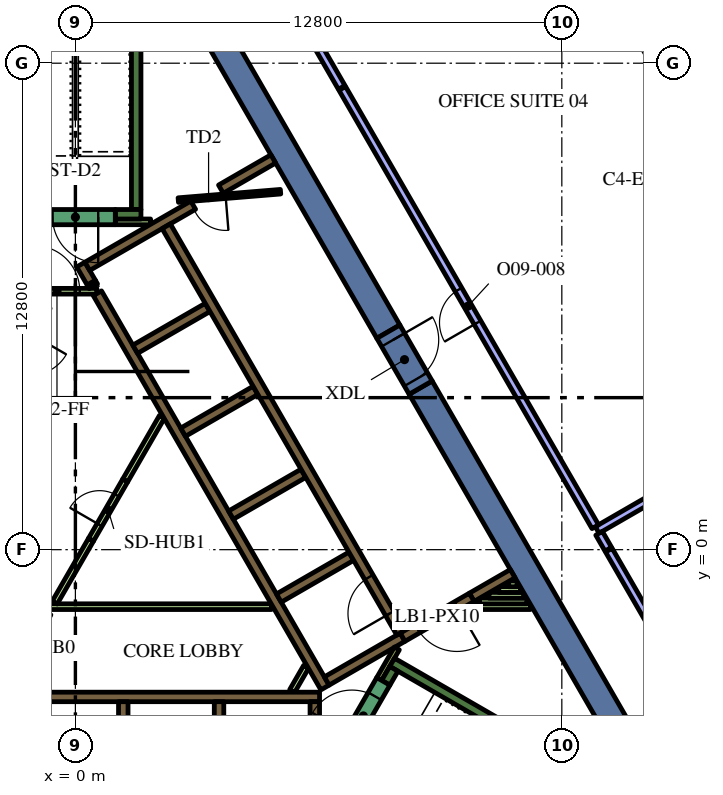
"""IFC4 building model, lengths in metres.
Left out: names, types, materials, properties, quantities, classifications, styles, units other than length and angle.
Written with IfcOpenShell. Run it as: python <this file> out.ifc"""

import sys

from ifc_helpers import new_model, si_unit, direction, frame, frame_2d, origin, place, context, subcontext, project, spatial, rectangle, extrude, element, fill, save


model = new_model("IFC4")
c1 = context("Model", 3, precision=1e-05, world=origin(), true_north=direction((0.0, 1.0)))
c2 = subcontext(c1, "Body", "Model", "MODEL_VIEW")
j1 = project(units=[si_unit("LENGTHUNIT", "METRE"), si_unit("PLANEANGLEUNIT", "RADIAN")], contexts=[c1])
p1 = place(None, origin())
s1 = spatial("IfcSite", under=j1, at=p1, CompositionType="ELEMENT")
p2 = place(p1, origin())
s2 = spatial("IfcBuilding", under=s1, at=p2, CompositionType="ELEMENT")
p3 = place(p2, frame((0.0, 0.0, 243.6)))
s3 = spatial("IfcBuildingStorey", under=s2, at=p3, CompositionType="ELEMENT", Elevation=243.6)
for number, where, z_axis, x_axis in (
    (1, (9.085, 4.264, 0.0), (0.0, 0.0, 1.0), (0.5, -0.866, 0.0)),
    (2, (8.235, 5.736, 0.0), (0.0, 0.0, 1.0), (-0.5, 0.866, 0.0)),
):
    element("IfcWall", number, at=place(p3, frame(where, z_axis=z_axis, x_axis=x_axis)), inside=s3, PredefinedType="SOLIDWALL", context=c2, shape_type="SweptSolid", body=[
        extrude(rectangle(XDim=12.472, YDim=0.7, at=frame_2d((6.236, 0.0))), origin(), (0.0, 0.0, 1.0), 4.2),
    ])
p4 = place(p3, frame((8.334, -2.964, 0.0), z_axis=(0.0, 0.0, 1.0), x_axis=(0.866016039709, -0.500016218704, 0.0)))
e3 = element("IfcWall", 3, at=p4, inside=s3, PredefinedType="SOLIDWALL", context=c2, shape_type="SweptSolid", body=[
    extrude(rectangle(XDim=7.05, YDim=0.25, at=frame_2d((3.525, 0.0))), origin(), (0.0, 0.0, 1.0), 4.2),
])
p5 = place(p3, frame((8.168, -3.503, 0.0), z_axis=(0.0, 0.0, 1.0), x_axis=(0.49972245349, 0.866185586049, 0.0)))
e4 = element("IfcWall", 4, at=p5, inside=s3, PredefinedType="SOLIDWALL", context=c2, shape_type="SweptSolid", body=[
    extrude(rectangle(XDim=0.425, YDim=0.25, at=frame_2d((0.212, 0.0))), origin(), (0.0, 0.0, 1.0), 4.2),
])
p6 = place(p3, frame((1.6, 8.95, 0.0), z_axis=(0.0, 0.0, 1.0), x_axis=(0.0, 1.0, 0.0)))
e5 = element("IfcWall", 5, at=p6, inside=s3, PredefinedType="SOLIDWALL", context=c2, shape_type="SweptSolid", body=[
    extrude(rectangle(XDim=6.8, YDim=0.25, at=frame_2d((3.4, 0.0))), origin(), (0.0, 0.0, 1.0), 4.2),
])
p7 = place(p3, frame((1.05, 8.825, 0.0), z_axis=(0.0, 0.0, 1.0), x_axis=(1.0, 0.0, 0.0)))
e6 = element("IfcWall", 6, at=p7, inside=s3, PredefinedType="SOLIDWALL", context=c2, shape_type="SweptSolid", body=[
    extrude(rectangle(XDim=0.675, YDim=0.25, at=frame_2d((0.337, 0.0))), origin(), (0.0, 0.0, 1.0), 4.2),
])
p8 = place(p3, frame((-5.545, -3.875, 0.0), z_axis=(0.0, 0.0, 1.0), x_axis=(1.0, 0.0, 0.0)))
e7 = element("IfcWall", 7, at=p8, inside=s3, PredefinedType="SOLIDWALL", context=c2, shape_type="SweptSolid", body=[
    extrude(rectangle(XDim=11.97, YDim=0.25, at=frame_2d((5.985, 0.0))), origin(), (0.0, 0.0, 1.0), 4.2),
])
p9 = place(p3, frame((6.3, -7.24, 0.0), z_axis=(0.0, 0.0, 1.0), x_axis=(0.0, 1.0, 0.0)))
e8 = element("IfcWall", 8, at=p9, inside=s3, PredefinedType="SOLIDWALL", context=c2, shape_type="SweptSolid", body=[
    extrude(rectangle(XDim=3.24, YDim=0.25, at=frame_2d((1.62, 0.0))), origin(), (0.0, 0.0, 1.0), 4.2),
])
for number, where, z_axis, x_axis in (
    (9, (3.78, -4.0, 0.0), (0.0, 0.0, 1.0), (0.0, -1.0, 0.0)),
    (10, (1.26, -4.0, 0.0), (0.0, 0.0, 1.0), (0.0, -1.0, 0.0)),
):
    element("IfcWall", number, at=place(p3, frame(where, z_axis=z_axis, x_axis=x_axis)), inside=s3, PredefinedType="SOLIDWALL", context=c2, shape_type="SweptSolid", body=[
        extrude(rectangle(XDim=2.2, YDim=0.25, at=frame_2d((1.1, 0.0))), origin(), (0.0, 0.0, 1.0), 4.2),
    ])
p10 = place(p3, frame((11.507, -0.631, 0.0), z_axis=(0.0, 0.0, 1.0), x_axis=(-0.866025525965, -0.499999788377, 0.0)))
e11 = element("IfcWall", 11, at=p10, inside=s3, PredefinedType="SOLIDWALL", context=c2, shape_type="SweptSolid", body=[
    extrude(rectangle(XDim=1.245, YDim=0.25, at=frame_2d((0.622, 0.0))), origin(), (0.0, 0.0, 1.0), 4.2),
])
p11 = place(p3, frame((0.473, 6.93, 0.0), z_axis=(0.0, 0.0, 1.0), x_axis=(-0.49972245349, 0.866185586049, 0.0)))
e12 = element("IfcWall", 12, at=p11, inside=s3, PredefinedType="SOLIDWALL", context=c2, shape_type="SweptSolid", body=[
    extrude(rectangle(XDim=0.11, YDim=0.25, at=frame_2d((0.055, 0.0))), origin(), (0.0, 0.0, 1.0), 4.2),
])
p12 = place(p3, frame((6.568, -3.627, 0.0), z_axis=(0.0, 0.0, 1.0), x_axis=(-0.499999455981, 0.866025717874, 0.0)))
e13 = element("IfcWall", 13, at=p12, inside=s3, PredefinedType="SOLIDWALL", context=c2, shape_type="SweptSolid", body=[
    extrude(rectangle(XDim=11.978, YDim=0.25, at=frame_2d((5.989, 0.0))), origin(), (0.0, 0.0, 1.0), 4.2),
])
p13 = place(p3, frame((0.417, 7.027, 0.0), z_axis=(0.0, 0.0, 1.0), x_axis=(-0.500210807569, 0.865903659763, 0.0)))
e14 = element("IfcWall", 14, at=p13, inside=s3, PredefinedType="SOLIDWALL", context=c2, shape_type="SweptSolid", body=[
    extrude(rectangle(XDim=0.548, YDim=0.25, at=frame_2d((0.274, 0.0))), origin(), (0.0, 0.0, 1.0), 4.2),
])
p14 = place(p3, frame((3.1, 9.064, 0.0), z_axis=(0.0, 0.0, 1.0), x_axis=(-0.866030133475, -0.499991807846, 0.0)))
e15 = element("IfcWall", 15, at=p14, inside=s3, PredefinedType="SOLIDWALL", context=c2, shape_type="SweptSolid", body=[
    extrude(rectangle(XDim=3.217, YDim=0.25, at=frame_2d((1.608, 0.0))), origin(), (0.0, 0.0, 1.0), 4.2),
])
p15 = place(p3, frame((1.574, 5.274, 0.0), z_axis=(0.0, 0.0, 1.0), x_axis=(0.866028486751, 0.499994660107, 0.0)))
e16 = element("IfcWall", 16, at=p15, inside=s3, PredefinedType="SOLIDWALL", context=c2, shape_type="SweptSolid", body=[
    extrude(rectangle(XDim=2.2, YDim=0.25, at=frame_2d((1.1, 0.0))), origin(), (0.0, 0.0, 1.0), 4.2),
])
for number, where, z_axis, x_axis in (
    (17, (2.834, 3.091, 0.0), (0.0, 0.0, 1.0), (0.866, 0.5, 0.0)),
    (18, (4.094, 0.909, 0.0), (0.0, 0.0, 1.0), (0.866, 0.5, 0.0)),
    (19, (5.354, -1.274, 0.0), (0.0, 0.0, 1.0), (0.866, 0.5, 0.0)),
):
    element("IfcWall", number, at=place(p3, frame(where, z_axis=z_axis, x_axis=x_axis)), inside=s3, PredefinedType="SOLIDWALL", context=c2, shape_type="SweptSolid", body=[
        extrude(rectangle(XDim=2.2, YDim=0.25, at=frame_2d((1.1, 0.0))), origin(), (0.0, 0.0, 1.0), 4.2),
    ])
p16 = place(p3, frame((6.614, -3.456, 0.0), z_axis=(0.0, 0.0, 1.0), x_axis=(0.866025089694, 0.500000544019, 0.0)))
e20 = element("IfcWall", 20, at=p16, inside=s3, PredefinedType="SOLIDWALL", context=c2, shape_type="SweptSolid", body=[
    extrude(rectangle(XDim=2.305, YDim=0.25, at=frame_2d((1.153, 0.0))), origin(), (0.0, 0.0, 1.0), 4.2),
])
p17 = place(p3, frame((3.83, 9.486, 0.0), z_axis=(0.0, 0.0, 1.0), x_axis=(0.865986202621, 0.500067892261, 0.0)))
e21 = element("IfcWall", 21, at=p17, inside=s3, PredefinedType="SOLIDWALL", context=c2, shape_type="SweptSolid", body=[
    extrude(rectangle(XDim=1.591, YDim=0.25, at=frame_2d((0.795, 0.0))), origin(), (0.0, 0.0, 1.0), 4.2),
])
p18 = place(p3, frame((1.05, 8.625, 0.0), z_axis=(0.0, 0.0, 1.0), x_axis=(1.0, 0.0, 0.0)))
e22 = element("IfcWall", 22, at=p18, inside=s3, PredefinedType="PARTITIONING", context=c2, shape_type="SweptSolid", body=[
    extrude(rectangle(XDim=0.929, YDim=0.15, at=frame_2d((0.464, 0.0))), origin(), (0.0, 0.0, 1.0), 3.45),
])
p19 = place(p3, frame((10.362, -1.5, 0.0), z_axis=(0.0, 0.0, 1.0), x_axis=(1.0, 0.0, 0.0)))
e23 = element("IfcWall", 23, at=p19, inside=s3, PredefinedType="PARTITIONING", context=c2, shape_type="SweptSolid", body=[
    extrude(rectangle(XDim=1.61, YDim=0.15, at=frame_2d((0.805, 0.0))), origin(), (0.0, 0.0, 1.0), 3.45),
])
p20 = place(p3, frame((10.622, -1.35, 0.0), z_axis=(0.0, 0.0, 1.0), x_axis=(1.0, 0.0, 0.0)))
e24 = element("IfcWall", 24, at=p20, inside=s3, PredefinedType="PARTITIONING", context=c2, shape_type="SweptSolid", body=[
    extrude(rectangle(XDim=1.263, YDim=0.15, at=frame_2d((0.632, 0.0))), origin(), (0.0, 0.0, 1.0), 3.45),
])
p21 = place(p3, frame((10.882, -1.2, 0.0), z_axis=(0.0, 0.0, 1.0), x_axis=(1.0, 0.0, 0.0)))
e25 = element("IfcWall", 25, at=p21, inside=s3, PredefinedType="PARTITIONING", context=c2, shape_type="SweptSolid", body=[
    extrude(rectangle(XDim=0.917, YDim=0.15, at=frame_2d((0.459, 0.0))), origin(), (0.0, 0.0, 1.0), 3.45),
])
p22 = place(p3, frame((11.712, -1.05, 0.0), z_axis=(0.0, 0.0, 1.0), x_axis=(-1.0, 0.0, 0.0)))
e26 = element("IfcWall", 26, at=p22, inside=s3, PredefinedType="PARTITIONING", context=c2, shape_type="SweptSolid", body=[
    extrude(rectangle(XDim=0.571, YDim=0.15, at=frame_2d((0.285, 0.0))), origin(), (0.0, 0.0, 1.0), 3.45),
])
p23 = place(p3, frame((11.401, -0.9, 0.0), z_axis=(0.0, 0.0, 1.0), x_axis=(1.0, 0.0, 0.0)))
e27 = element("IfcWall", 27, at=p23, inside=s3, PredefinedType="PARTITIONING", context=c2, shape_type="SweptSolid", body=[
    extrude(rectangle(XDim=0.224, YDim=0.15, at=frame_2d((0.112, 0.0))), origin(), (0.0, 0.0, 1.0), 3.45),
])
p24 = place(p3, frame((8.459, -2.599, 0.0), z_axis=(0.0, 0.0, 1.0), x_axis=(-0.500041054325, -0.866001699761, 0.0)))
e28 = element("IfcWall", 28, at=p24, inside=s3, PredefinedType="PARTITIONING", context=c2, shape_type="SweptSolid", body=[
    extrude(rectangle(XDim=0.929, YDim=0.15, at=frame_2d((0.464, 0.0))), origin(), (0.0, 0.0, 1.0), 4.2),
])
p25 = place(p3, frame((5.705, -3.718, 0.0), z_axis=(0.0, 0.0, 1.0), x_axis=(0.499962090823, 0.866047289552, 0.0)))
e29 = element("IfcWall", 29, at=p25, inside=s3, PredefinedType="PARTITIONING", context=c2, shape_type="SweptSolid", body=[
    extrude(rectangle(XDim=0.735, YDim=0.15, at=frame_2d((0.367, 0.0))), origin(), (0.0, 0.0, 1.0), 3.45),
])
p26 = place(p3, frame((-4.2, -1.5, 0.0), z_axis=(0.0, 0.0, 1.0), x_axis=(1.0, 0.0, 0.0)))
e30 = element("IfcWall", 30, at=p26, inside=s3, PredefinedType="PARTITIONING", context=c2, shape_type="SweptSolid", body=[
    extrude(rectangle(XDim=9.359, YDim=0.15, at=frame_2d((4.68, 0.0))), origin(), (0.0, 0.0, 1.0), 3.45),
])
p27 = place(p3, frame((-0.544, -1.393, 0.0), z_axis=(0.0, 0.0, 1.0), x_axis=(0.499928740635, 0.866066541489, 0.0)))
e31 = element("IfcWall", 31, at=p27, inside=s3, PredefinedType="PARTITIONING", context=c2, shape_type="SweptSolid", body=[
    extrude(rectangle(XDim=1.912, YDim=0.15, at=frame_2d((0.956, 0.0))), origin(), (0.0, 0.0, 1.0), 3.45),
])
p28 = place(p3, frame((1.312, 1.822, 0.0), z_axis=(0.0, 0.0, 1.0), x_axis=(0.500003549559, 0.866023354436, 0.0)))
e32 = element("IfcWall", 32, at=p28, inside=s3, PredefinedType="PARTITIONING", context=c2, shape_type="SweptSolid", body=[
    extrude(rectangle(XDim=1.93, YDim=0.15, at=frame_2d((0.965, 0.0))), origin(), (0.0, 0.0, 1.0), 3.45),
])
p29 = place(p3, frame((8.565, -2.185, 0.0), z_axis=(0.0, 0.0, 1.0), x_axis=(-0.499997954832, 0.866026584559, 0.0)))
e33 = element("IfcWall", 33, at=p29, inside=s3, PredefinedType="SOLIDWALL", context=c2, shape_type="SweptSolid", body=[
    extrude(rectangle(XDim=12.35, YDim=0.25, at=frame_2d((6.175, 0.0))), origin(), (0.0, 0.0, 1.0), 4.2),
])
p30 = place(p29, frame((0.585, 0.0, 0.0)))
e34 = element("IfcOpeningElement", 34, at=p30, cuts=e33, PredefinedType="OPENING", context=c2, shape_type="SweptSolid", body=[
    extrude(rectangle(XDim=1.1, YDim=2.1, at=frame_2d((0.55, 1.05))), frame((0.0, 0.135, 0.0), z_axis=(0.0, -1.0, 0.0), x_axis=(1.0, 0.0, 0.0)), (0.0, 0.0, 1.0), 0.27),
])
p31 = place(p3, frame((7.053, -5.284, 0.0), z_axis=(0.0, 0.0, 1.0), x_axis=(0.500078061341, 0.865980330357, 0.0)))
e35 = element("IfcWall", 35, at=p31, inside=s3, PredefinedType="SOLIDWALL", context=c2, shape_type="SweptSolid", body=[
    extrude(rectangle(XDim=2.1, YDim=0.4, at=frame_2d((1.05, 0.0))), origin(), (0.0, 0.0, 1.0), 4.2),
])
p32 = place(p31, frame((0.45, 0.0, 0.0)))
e36 = element("IfcOpeningElement", 36, at=p32, cuts=e35, PredefinedType="OPENING", context=c2, shape_type="SweptSolid", body=[
    extrude(rectangle(XDim=1.2, YDim=2.1, at=frame_2d((0.6, 1.05))), frame((0.0, 0.21, 0.0), z_axis=(0.0, -1.0, 0.0), x_axis=(1.0, 0.0, 0.0)), (0.0, 0.0, 1.0), 0.42),
])
p33 = place(p3, frame((1.05, 8.75, 0.0), z_axis=(0.0, 0.0, 1.0), x_axis=(-1.0, 0.0, 0.0)))
e37 = element("IfcWall", 37, at=p33, inside=s3, PredefinedType="SOLIDWALL", context=c2, shape_type="SweptSolid", body=[
    extrude(rectangle(XDim=2.1, YDim=0.4, at=frame_2d((1.05, 0.0))), origin(), (0.0, 0.0, 1.0), 4.2),
])
p34 = place(p33, frame((0.45, 0.0, 0.0)))
e38 = element("IfcOpeningElement", 38, at=p34, cuts=e37, PredefinedType="OPENING", context=c2, shape_type="SweptSolid", body=[
    extrude(rectangle(XDim=1.2, YDim=2.1, at=frame_2d((0.6, 1.05))), frame((0.0, 0.21, 0.0), z_axis=(0.0, -1.0, 0.0), x_axis=(1.0, 0.0, 0.0)), (0.0, 0.0, 1.0), 0.42),
])
p35 = place(p3, frame((5.398, 9.419, 0.0), z_axis=(0.0, 0.0, 1.0), x_axis=(-0.996653416376, -0.081743303248, 0.0)))
e39 = element("IfcWall", 39, at=p35, inside=s3, PredefinedType="PARTITIONING", context=c2, shape_type="SweptSolid", body=[
    extrude(rectangle(XDim=2.7, YDim=0.12, at=frame_2d((1.35, 0.0))), origin(), (0.0, 0.0, 1.0), 3.45),
])
p36 = place(p35, frame((1.45, 0.0, 0.0)))
e40 = element("IfcOpeningElement", 40, at=p36, cuts=e39, PredefinedType="OPENING", context=c2, shape_type="SweptSolid", body=[
    extrude(rectangle(XDim=0.9, YDim=2.1, at=frame_2d((0.45, 1.05))), frame((0.0, 0.07, 0.0), z_axis=(0.0, -1.0, 0.0), x_axis=(1.0, 0.0, 0.0)), (0.0, 0.0, 1.0), 0.14),
])
p37 = place(p3, frame((-1.534, 6.8, 0.0), z_axis=(0.0, 0.0, 1.0), x_axis=(1.0, 0.0, 0.0)))
e41 = element("IfcWall", 41, at=p37, inside=s3, PredefinedType="PARTITIONING", context=c2, shape_type="SweptSolid", body=[
    extrude(rectangle(XDim=2.1, YDim=0.15, at=frame_2d((1.05, 0.0))), origin(), (0.0, 0.0, 1.0), 3.45),
])
p38 = place(p37, frame((0.45, 0.0, 0.0)))
e42 = element("IfcOpeningElement", 42, at=p38, cuts=e41, PredefinedType="OPENING", context=c2, shape_type="SweptSolid", body=[
    extrude(rectangle(XDim=1.2, YDim=2.1, at=frame_2d((0.6, 1.05))), frame((0.0, 0.085, 0.0), z_axis=(0.0, -1.0, 0.0), x_axis=(1.0, 0.0, 0.0)), (0.0, 0.0, 1.0), 0.17),
])
p39 = place(p3, frame((10.429, -1.253, 0.0), z_axis=(0.0, 0.0, 1.0), x_axis=(-0.866009402589, -0.500027713859, 0.0)))
e43 = element("IfcWall", 43, at=p39, inside=s3, PredefinedType="SOLIDWALL", context=c2, shape_type="SweptSolid", body=[
    extrude(rectangle(XDim=2.1, YDim=0.25, at=frame_2d((1.05, 0.0))), origin(), (0.0, 0.0, 1.0), 4.2),
])
p40 = place(p39, frame((0.45, 0.0, 0.0)))
e44 = element("IfcOpeningElement", 44, at=p40, cuts=e43, PredefinedType="OPENING", context=c2, shape_type="SweptSolid", body=[
    extrude(rectangle(XDim=1.2, YDim=2.1, at=frame_2d((0.6, 1.05))), frame((0.0, 0.135, 0.0), z_axis=(0.0, -1.0, 0.0), x_axis=(1.0, 0.0, 0.0)), (0.0, 0.0, 1.0), 0.27),
])
p41 = place(p3, frame((8.235, 5.736, 0.0), z_axis=(0.0, 0.0, 1.0), x_axis=(0.499954529098, -0.86605165483, 0.0)))
e45 = element("IfcWall", 45, at=p41, inside=s3, PredefinedType="SOLIDWALL", context=c2, shape_type="SweptSolid", body=[
    extrude(rectangle(XDim=1.7, YDim=0.7, at=frame_2d((0.85, 0.0))), origin(), (0.0, 0.0, 1.0), 4.2),
])
p42 = place(p41, frame((0.25, 0.0, 0.0)))
e46 = element("IfcOpeningElement", 46, at=p42, cuts=e45, PredefinedType="OPENING", context=c2, shape_type="SweptSolid", body=[
    extrude(rectangle(XDim=1.2, YDim=2.1, at=frame_2d((0.6, 1.05))), frame((0.0, 0.36, 0.0), z_axis=(0.0, -1.0, 0.0), x_axis=(1.0, 0.0, 0.0)), (0.0, 0.0, 1.0), 0.72),
])
p43 = place(p3, frame((0.412, 0.263, 0.0), z_axis=(0.0, 0.0, 1.0), x_axis=(0.500062916607, 0.865989075817, 0.0)))
e47 = element("IfcWall", 47, at=p43, inside=s3, PredefinedType="PARTITIONING", context=c2, shape_type="SweptSolid", body=[
    extrude(rectangle(XDim=1.8, YDim=0.15, at=frame_2d((0.9, 0.0))), origin(), (0.0, 0.0, 1.0), 3.45),
])
p44 = place(p43, frame((0.45, 0.0, 0.0)))
e48 = element("IfcOpeningElement", 48, at=p44, cuts=e47, PredefinedType="OPENING", context=c2, shape_type="SweptSolid", body=[
    extrude(rectangle(XDim=0.9, YDim=2.1, at=frame_2d((0.45, 1.05))), frame((0.0, 0.085, 0.0), z_axis=(0.0, -1.0, 0.0), x_axis=(1.0, 0.0, 0.0)), (0.0, 0.0, 1.0), 0.17),
])
p45 = place(p3, frame((13.731, 0.518, 0.0), z_axis=(0.0, 0.0, 1.0), x_axis=(0.8660128559, 0.500021732944, 0.0)))
e49 = element("IfcWall", 49, at=p45, inside=s3, PredefinedType="PARTITIONING", context=c2, shape_type="SweptSolid", body=[
    extrude(rectangle(XDim=3.625, YDim=0.2, at=frame_2d((1.812, 0.0))), origin(), (0.0, 0.0, 1.0), 3.45),
])
p46 = place(p3, frame((14.022, 0.013, 0.0), z_axis=(0.0, 0.0, 1.0), x_axis=(-0.500159754115, 0.865933150054, 0.0)))
e50 = element("IfcWall", 50, at=p46, inside=s3, PredefinedType="PARTITIONING", context=c2, shape_type="SweptSolid", body=[
    extrude(rectangle(XDim=0.483, YDim=0.2, at=frame_2d((0.242, 0.0))), origin(), (0.0, 0.0, 1.0), 3.45),
])
p47 = place(p3, frame((17.681, -6.324, 0.0), z_axis=(0.0, 0.0, 1.0), x_axis=(-0.50002695829, 0.866009838849, 0.0)))
e51 = element("IfcWall", 51, at=p47, inside=s3, PredefinedType="PARTITIONING", context=c2, shape_type="SweptSolid", body=[
    extrude(rectangle(XDim=7.287, YDim=0.2, at=frame_2d((3.644, 0.0))), origin(), (0.0, 0.0, 1.0), 3.45),
])
p48 = place(p47, frame((3.1, 0.0, 0.0)))
e52 = element("IfcOpeningElement", 52, at=p48, cuts=e51, PredefinedType="OPENING", context=c2, shape_type="SweptSolid", body=[
    extrude(rectangle(XDim=1.0, YDim=2.1, at=frame_2d((0.5, 1.05))), frame((0.0, 0.11, 0.0), z_axis=(0.0, -1.0, 0.0), x_axis=(1.0, 0.0, 0.0)), (0.0, 0.0, 1.0), 0.22),
])
p49 = place(p3, frame((13.681, 0.604, 0.0), z_axis=(0.0, 0.0, 1.0), x_axis=(-0.500001759768, 0.86602438778, 0.0)))
e53 = element("IfcWall", 53, at=p49, inside=s3, PredefinedType="PARTITIONING", context=c2, shape_type="SweptSolid", body=[
    extrude(rectangle(XDim=13.317, YDim=0.2, at=frame_2d((6.658, 0.0))), origin(), (0.0, 0.0, 1.0), 3.45),
])
p50 = place(p49, frame((6.2, 0.0, 0.0)))
e54 = element("IfcOpeningElement", 54, at=p50, cuts=e53, PredefinedType="OPENING", context=c2, shape_type="SweptSolid", body=[
    extrude(rectangle(XDim=1.0, YDim=2.1, at=frame_2d((0.5, 1.05))), frame((0.0, 0.11, 0.0), z_axis=(0.0, -1.0, 0.0), x_axis=(1.0, 0.0, 0.0)), (0.0, 0.0, 1.0), 0.22),
])
p51 = place(p3, frame((7.007, 12.163, 0.0), z_axis=(0.0, 0.0, 1.0), x_axis=(-0.499986040413, 0.866033463206, 0.0)))
e55 = element("IfcWall", 55, at=p51, inside=s3, PredefinedType="PARTITIONING", context=c2, shape_type="SweptSolid", body=[
    extrude(rectangle(XDim=5.693, YDim=0.2, at=frame_2d((2.846, 0.0))), origin(), (0.0, 0.0, 1.0), 3.45),
])
p52 = place(p3, frame((16.782, 10.331, 0.0), z_axis=(0.0, 0.0, 1.0), x_axis=(-0.517846166225, 0.855473756538, 0.0)))
e56 = element("IfcWall", 56, at=p52, inside=s3, PredefinedType="SOLIDWALL", context=c2, shape_type="SweptSolid", body=[
    extrude(rectangle(XDim=5.298, YDim=0.24, at=frame_2d((2.649, 0.0))), origin(), (0.0, 0.0, 1.0), 3.95),
])
p53 = place(p52, frame((0.294, 0.0, 0.9)))
e57 = element("IfcOpeningElement", 57, at=p53, cuts=e56, PredefinedType="OPENING", context=c2, shape_type="SweptSolid", body=[
    extrude(rectangle(XDim=1.5, YDim=2.55, at=frame_2d((0.75, 1.275))), frame((0.0, 0.13, 0.0), z_axis=(0.0, -1.0, 0.0), x_axis=(1.0, 0.0, 0.0)), (0.0, 0.0, 1.0), 0.26),
])
p54 = place(p52, frame((3.504, 0.0, 0.9)))
e58 = element("IfcOpeningElement", 58, at=p54, cuts=e56, PredefinedType="OPENING", context=c2, shape_type="SweptSolid", body=[
    extrude(rectangle(XDim=1.5, YDim=2.55, at=frame_2d((0.75, 1.275))), frame((0.0, 0.13, 0.0), z_axis=(0.0, -1.0, 0.0), x_axis=(1.0, 0.0, 0.0)), (0.0, 0.0, 1.0), 0.26),
])
p55 = place(p30, origin())
e59 = element("IfcDoor", 59, at=p55, inside=s3, OperationType="DOUBLE_DOOR_SLIDING", PredefinedType="DOOR", context=c2, shape_type="SweptSolid", body=[
    extrude(rectangle(XDim=1.1, YDim=2.1, at=frame_2d((0.55, 1.05))), frame((0.0, 0.025, 0.0), z_axis=(0.0, -1.0, 0.0), x_axis=(1.0, 0.0, 0.0)), (0.0, 0.0, 1.0), 0.05),
])
fill(e34, e59)
p56 = place(p32, origin())
e60 = element("IfcDoor", 60, at=p56, inside=s3, OperationType="SINGLE_SWING_LEFT", PredefinedType="DOOR", context=c2, shape_type="SweptSolid", body=[
    extrude(rectangle(XDim=1.2, YDim=2.1, at=frame_2d((0.6, 1.05))), frame((0.0, 0.025, 0.0), z_axis=(0.0, -1.0, 0.0), x_axis=(1.0, 0.0, 0.0)), (0.0, 0.0, 1.0), 0.05),
])
fill(e36, e60)
p57 = place(p34, origin())
e61 = element("IfcDoor", 61, at=p57, inside=s3, OperationType="SINGLE_SWING_LEFT", PredefinedType="DOOR", context=c2, shape_type="SweptSolid", body=[
    extrude(rectangle(XDim=1.2, YDim=2.1, at=frame_2d((0.6, 1.05))), frame((0.0, 0.025, 0.0), z_axis=(0.0, -1.0, 0.0), x_axis=(1.0, 0.0, 0.0)), (0.0, 0.0, 1.0), 0.05),
])
fill(e38, e61)
p58 = place(p36, origin())
e62 = element("IfcDoor", 62, at=p58, inside=s3, OperationType="SINGLE_SWING_LEFT", PredefinedType="DOOR", context=c2, shape_type="SweptSolid", body=[
    extrude(rectangle(XDim=0.9, YDim=2.1, at=frame_2d((0.45, 1.05))), frame((0.0, 0.025, 0.0), z_axis=(0.0, -1.0, 0.0), x_axis=(1.0, 0.0, 0.0)), (0.0, 0.0, 1.0), 0.05),
])
fill(e40, e62)
p59 = place(p38, origin())
e63 = element("IfcDoor", 63, at=p59, inside=s3, OperationType="SINGLE_SWING_LEFT", PredefinedType="DOOR", context=c2, shape_type="SweptSolid", body=[
    extrude(rectangle(XDim=1.2, YDim=2.1, at=frame_2d((0.6, 1.05))), frame((0.0, 0.025, 0.0), z_axis=(0.0, -1.0, 0.0), x_axis=(1.0, 0.0, 0.0)), (0.0, 0.0, 1.0), 0.05),
])
fill(e42, e63)
p60 = place(p40, origin())
e64 = element("IfcDoor", 64, at=p60, inside=s3, OperationType="SINGLE_SWING_LEFT", PredefinedType="DOOR", context=c2, shape_type="SweptSolid", body=[
    extrude(rectangle(XDim=1.2, YDim=2.1, at=frame_2d((0.6, 1.05))), frame((0.0, 0.025, 0.0), z_axis=(0.0, -1.0, 0.0), x_axis=(1.0, 0.0, 0.0)), (0.0, 0.0, 1.0), 0.05),
])
fill(e44, e64)
p61 = place(p42, origin())
e65 = element("IfcDoor", 65, at=p61, inside=s3, OperationType="SINGLE_SWING_LEFT", PredefinedType="DOOR", context=c2, shape_type="SweptSolid", body=[
    extrude(rectangle(XDim=1.2, YDim=2.1, at=frame_2d((0.6, 1.05))), frame((0.0, 0.025, 0.0), z_axis=(0.0, -1.0, 0.0), x_axis=(1.0, 0.0, 0.0)), (0.0, 0.0, 1.0), 0.05),
])
fill(e46, e65)
p62 = place(p44, origin())
e66 = element("IfcDoor", 66, at=p62, inside=s3, OperationType="SINGLE_SWING_LEFT", PredefinedType="DOOR", context=c2, shape_type="SweptSolid", body=[
    extrude(rectangle(XDim=0.9, YDim=2.1, at=frame_2d((0.45, 1.05))), frame((0.0, 0.025, 0.0), z_axis=(0.0, -1.0, 0.0), x_axis=(1.0, 0.0, 0.0)), (0.0, 0.0, 1.0), 0.05),
])
fill(e48, e66)
p63 = place(p50, origin())
e67 = element("IfcDoor", 67, at=p63, inside=s3, OperationType="SINGLE_SWING_RIGHT", PredefinedType="DOOR", context=c2, shape_type="SweptSolid", body=[
    extrude(rectangle(XDim=1.0, YDim=2.1, at=frame_2d((0.5, 1.05))), frame((0.0, 0.025, 0.0), z_axis=(0.0, -1.0, 0.0), x_axis=(1.0, 0.0, 0.0)), (0.0, 0.0, 1.0), 0.05),
])
fill(e54, e67)
save(model, sys.argv[1])
